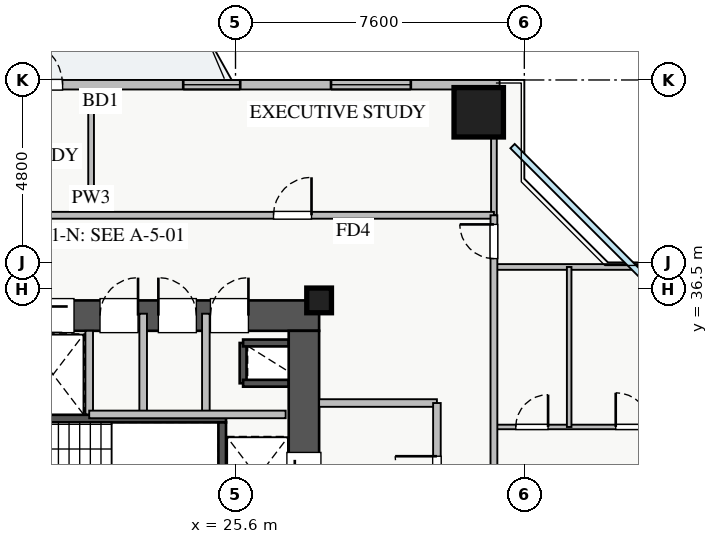
"""IFC4 building model, lengths in metres.
Left out: names, types, materials, properties, quantities, classifications, styles, units other than length and angle.
Written with IfcOpenShell. Run it as: python <this file> out.ifc"""

import sys

from ifc_helpers import new_model, si_unit, direction, frame, frame_2d, origin, origin_2d, place, context, subcontext, project, spatial, rectangle, extrude, source, transform, mapped, element, fill, save


model = new_model("IFC4")
c1 = context("Model", 3, precision=1e-05, world=origin(), true_north=direction((0.0, 1.0)))
c2 = subcontext(c1, "Body", "Model", "MODEL_VIEW")
j1 = project(units=[si_unit("LENGTHUNIT", "METRE"), si_unit("PLANEANGLEUNIT", "RADIAN")], contexts=[c1])
p1 = place(None, origin())
s1 = spatial("IfcSite", under=j1, at=p1, CompositionType="ELEMENT")
p2 = place(p1, origin())
s2 = spatial("IfcBuilding", under=s1, at=p2, CompositionType="ELEMENT")
p3 = place(p2, frame((0.0, 0.0, 50.25)))
s3 = spatial("IfcBuildingStorey", under=s2, at=p3, CompositionType="ELEMENT", Elevation=50.25)
p4 = place(p3, frame((25.8, 34.02, 0.0), z_axis=(0.0, 0.0, 1.0), x_axis=(0.0, 1.0, 0.0)))
e1 = element("IfcWall", 1, at=p4, inside=s3, PredefinedType="SHEAR", context=c2, shape_type="SweptSolid", body=[
    extrude(rectangle(XDim=1.06, YDim=0.18, at=frame_2d((0.53, 0.0))), origin(), (0.0, 0.0, 1.0), 3.07),
])
for number, where, z_axis, x_axis in (
    (2, (25.8, 35.08, 0.0), (0.0, 0.0, 1.0), (1.0, 0.0, 0.0)),
    (3, (25.8, 34.02, 0.0), (0.0, 0.0, 1.0), (1.0, 0.0, 0.0)),
):
    element("IfcWall", number, at=place(p3, frame(where, z_axis=z_axis, x_axis=x_axis)), inside=s3, PredefinedType="SHEAR", context=c2, shape_type="SweptSolid", body=[
        extrude(rectangle(XDim=1.2, YDim=0.18, at=frame_2d((0.6, 0.0))), origin(), (0.0, 0.0, 1.0), 3.07),
    ])
p5 = place(p3, frame((19.88, 33.2, 0.0), z_axis=(0.0, 0.0, 1.0), x_axis=(1.0, 0.0, 0.0)))
e4 = element("IfcWall", 4, at=p5, inside=s3, PredefinedType="SHEAR", context=c2, shape_type="SweptSolid", body=[
    extrude(rectangle(XDim=1.87, YDim=0.18, at=frame_2d((0.935, 0.0))), origin(), (0.0, 0.0, 1.0), 3.07),
])
p6 = place(p3, frame((18.2, 33.09, 0.0), z_axis=(0.0, 0.0, 1.0), x_axis=(1.0, 0.0, 0.0)))
e5 = element("IfcWall", 5, at=p6, inside=s3, PredefinedType="SHEAR", context=c2, shape_type="SweptSolid", body=[
    extrude(rectangle(XDim=7.15, YDim=0.2, at=frame_2d((3.575, 0.0))), origin(), (0.0, 0.0, 1.0), 3.25),
])
p7 = place(p6, frame((0.35, 0.0, 0.0)))
e6 = element("IfcOpeningElement", 6, at=p7, cuts=e5, PredefinedType="OPENING", context=c2, shape_type="SweptSolid", body=[
    extrude(rectangle(XDim=1.1, YDim=2.05, at=frame_2d((0.55, 1.025))), frame((0.0, 0.11, 0.0), z_axis=(0.0, -1.0, 0.0), x_axis=(1.0, 0.0, 0.0)), (0.0, 0.0, 1.0), 0.22),
])
p8 = place(p3, frame((25.25, 30.05, 0.0), z_axis=(0.0, 0.0, 1.0), x_axis=(0.0, 1.0, 0.0)))
e7 = element("IfcWall", 7, at=p8, inside=s3, PredefinedType="SHEAR", context=c2, shape_type="SweptSolid", body=[
    extrude(rectangle(XDim=2.94, YDim=0.2, at=frame_2d((1.47, 0.0))), origin(), (0.0, 0.0, 1.0), 3.25),
])
p9 = place(p3, frame((10.2, 35.8, 0.0), z_axis=(0.0, 0.0, 1.0), x_axis=(1.0, 0.0, 0.0)))
e8 = element("IfcWall", 8, at=p9, inside=s3, PredefinedType="SHEAR", context=c2, shape_type="SweptSolid", body=[
    extrude(rectangle(XDim=17.6, YDim=0.8, at=frame_2d((8.8, 0.0))), origin(), (0.0, 0.0, 1.0), 3.25),
])
p10 = place(p9, frame((1.15, 0.0, 0.0)))
e9 = element("IfcOpeningElement", 9, at=p10, cuts=e8, PredefinedType="OPENING", context=c2, shape_type="SweptSolid", body=[
    extrude(rectangle(XDim=1.1, YDim=2.05, at=frame_2d((0.55, 1.025))), frame((0.0, 0.41, 0.0), z_axis=(0.0, -1.0, 0.0), x_axis=(1.0, 0.0, 0.0)), (0.0, 0.0, 1.0), 0.82),
])
p11 = place(p9, frame((8.3, 0.0, 0.0)))
e10 = element("IfcOpeningElement", 10, at=p11, cuts=e8, PredefinedType="OPENING", context=c2, shape_type="SweptSolid", body=[
    extrude(rectangle(XDim=1.1, YDim=2.05, at=frame_2d((0.55, 1.025))), frame((0.0, 0.41, 0.0), z_axis=(0.0, -1.0, 0.0), x_axis=(1.0, 0.0, 0.0)), (0.0, 0.0, 1.0), 0.82),
])
p12 = place(p9, frame((10.05, 0.0, 0.0)))
e11 = element("IfcOpeningElement", 11, at=p12, cuts=e8, PredefinedType="OPENING", context=c2, shape_type="SweptSolid", body=[
    extrude(rectangle(XDim=1.1, YDim=2.05, at=frame_2d((0.55, 1.025))), frame((0.0, 0.41, 0.0), z_axis=(0.0, -1.0, 0.0), x_axis=(1.0, 0.0, 0.0)), (0.0, 0.0, 1.0), 0.82),
])
p13 = place(p9, frame((14.74, 0.0, 0.0)))
e12 = element("IfcOpeningElement", 12, at=p13, cuts=e8, PredefinedType="OPENING", context=c2, shape_type="SweptSolid", body=[
    extrude(rectangle(XDim=1.0, YDim=2.05, at=frame_2d((0.5, 1.025))), frame((0.0, 0.41, 0.0), z_axis=(0.0, -1.0, 0.0), x_axis=(1.0, 0.0, 0.0)), (0.0, 0.0, 1.0), 0.82),
])
p14 = place(p9, frame((11.835, 0.0, 0.0)))
e13 = element("IfcOpeningElement", 13, at=p14, cuts=e8, PredefinedType="OPENING", context=c2, shape_type="SweptSolid", body=[
    extrude(rectangle(XDim=1.0, YDim=2.05, at=frame_2d((0.5, 1.025))), frame((0.0, 0.41, 0.0), z_axis=(0.0, -1.0, 0.0), x_axis=(1.0, 0.0, 0.0)), (0.0, 0.0, 1.0), 0.82),
])
p15 = place(p9, frame((13.37, 0.0, 0.0)))
e14 = element("IfcOpeningElement", 14, at=p15, cuts=e8, PredefinedType="OPENING", context=c2, shape_type="SweptSolid", body=[
    extrude(rectangle(XDim=1.0, YDim=2.05, at=frame_2d((0.5, 1.025))), frame((0.0, 0.41, 0.0), z_axis=(0.0, -1.0, 0.0), x_axis=(1.0, 0.0, 0.0)), (0.0, 0.0, 1.0), 0.82),
])
p16 = place(p3, frame((27.4, 29.8, 0.0), z_axis=(0.0, 0.0, 1.0), x_axis=(0.0, 1.0, 0.0)))
e15 = element("IfcWall", 15, at=p16, inside=s3, PredefinedType="SHEAR", context=c2, shape_type="SweptSolid", body=[
    extrude(rectangle(XDim=5.6, YDim=0.8, at=frame_2d((2.8, 0.0))), origin(), (0.0, 0.0, 1.0), 3.25),
])
p17 = place(p16, frame((1.1, 0.0, 0.0)))
e16 = element("IfcOpeningElement", 16, at=p17, cuts=e15, PredefinedType="OPENING", context=c2, shape_type="SweptSolid", body=[
    extrude(rectangle(XDim=1.3, YDim=2.05, at=frame_2d((0.65, 1.025))), frame((0.0, 0.41, 0.0), z_axis=(0.0, -1.0, 0.0), x_axis=(1.0, 0.0, 0.0)), (0.0, 0.0, 1.0), 0.82),
])
m1 = source(origin(), c2, "Body", "SweptSolid", [
    extrude(rectangle(XDim=0.65, YDim=0.65, at=origin_2d()), origin(), (0.0, 0.0, 1.0), 3.25),
])
p18 = place(p3, frame((27.8, 36.2, 0.0), z_axis=(0.0, 0.0, 1.0), x_axis=(1.0, 0.0, 0.0)))
e17 = element("IfcColumn", 17, at=p18, inside=s3, PredefinedType="PILASTER", context=c2, shape_type="MappedRepresentation", body=[
    mapped(m1, transform((0.0, 0.0, 0.0), x_axis=(1.0, 0.0, 0.0), y_axis=(0.0, 1.0, 0.0), z_axis=(0.0, 0.0, 1.0), scale=1.0)),
])
m2 = source(origin(), c2, "Body", "SweptSolid", [
    extrude(rectangle(XDim=1.3, YDim=1.3, at=origin_2d()), origin(), (0.0, 0.0, 1.0), 3.25),
])
p19 = place(p3, frame((32.0, 41.15, 0.0), z_axis=(0.0, 0.0, 1.0), x_axis=(1.0, 0.0, 0.0)))
e18 = element("IfcColumn", 18, at=p19, inside=s3, PredefinedType="COLUMN", context=c2, shape_type="MappedRepresentation", body=[
    mapped(m2, transform((0.0, 0.0, 0.0), x_axis=(1.0, 0.0, 0.0), y_axis=(0.0, 1.0, 0.0), z_axis=(0.0, 0.0, 1.0), scale=1.0)),
])
p20 = place(p3, frame((5.45, 41.875, 0.0), z_axis=(0.0, 0.0, 1.0), x_axis=(1.0, 0.0, 0.0)))
e19 = element("IfcWall", 19, at=p20, inside=s3, PredefinedType="STANDARD", context=c2, shape_type="SweptSolid", body=[
    extrude(rectangle(XDim=27.1, YDim=0.25, at=frame_2d((13.55, 0.0))), origin(), (0.0, 0.0, 1.0), 2.61),
])
p21 = place(p20, frame((14.4, 0.0, 0.0)))
e20 = element("IfcOpeningElement", 20, at=p21, cuts=e19, PredefinedType="OPENING", context=c2, shape_type="SweptSolid", body=[
    extrude(rectangle(XDim=1.2, YDim=2.1, at=frame_2d((0.6, 1.05))), frame((0.0, 0.135, 0.0), z_axis=(0.0, -1.0, 0.0), x_axis=(1.0, 0.0, 0.0)), (0.0, 0.0, 1.0), 0.27),
])
p22 = place(p20, frame((1.5, 0.0, 0.9)))
e21 = element("IfcOpeningElement", 21, at=p22, cuts=e19, PredefinedType="OPENING", context=c2, shape_type="SweptSolid", body=[
    extrude(rectangle(XDim=1.5, YDim=1.5, at=frame_2d((0.75, 0.75))), frame((0.0, 0.135, 0.0), z_axis=(0.0, -1.0, 0.0), x_axis=(1.0, 0.0, 0.0)), (0.0, 0.0, 1.0), 0.27),
])
p23 = place(p20, frame((9.263, 0.0, 0.9)))
e22 = element("IfcOpeningElement", 22, at=p23, cuts=e19, PredefinedType="OPENING", context=c2, shape_type="SweptSolid", body=[
    extrude(rectangle(XDim=1.8, YDim=1.45, at=frame_2d((0.9, 0.725))), frame((0.0, 0.135, 0.0), z_axis=(0.0, -1.0, 0.0), x_axis=(1.0, 0.0, 0.0)), (0.0, 0.0, 1.0), 0.27),
])
p24 = place(p20, frame((18.774, 0.0, 0.9)))
e23 = element("IfcOpeningElement", 23, at=p24, cuts=e19, PredefinedType="OPENING", context=c2, shape_type="SweptSolid", body=[
    extrude(rectangle(XDim=1.5, YDim=1.5, at=frame_2d((0.75, 0.75))), frame((0.0, 0.135, 0.0), z_axis=(0.0, -1.0, 0.0), x_axis=(1.0, 0.0, 0.0)), (0.0, 0.0, 1.0), 0.27),
])
p25 = place(p20, frame((22.663, 0.0, 0.9)))
e24 = element("IfcOpeningElement", 24, at=p25, cuts=e19, PredefinedType="OPENING", context=c2, shape_type="SweptSolid", body=[
    extrude(rectangle(XDim=2.1, YDim=1.48, at=frame_2d((1.05, 0.74))), frame((0.0, 0.135, 0.0), z_axis=(0.0, -1.0, 0.0), x_axis=(1.0, 0.0, 0.0)), (0.0, 0.0, 1.0), 0.27),
])
p26 = place(p20, frame((5.134, 0.0, 0.9)))
e25 = element("IfcOpeningElement", 25, at=p26, cuts=e19, PredefinedType="OPENING", context=c2, shape_type="SweptSolid", body=[
    extrude(rectangle(XDim=2.4, YDim=1.5, at=frame_2d((1.2, 0.75))), frame((0.0, 0.135, 0.0), z_axis=(0.0, -1.0, 0.0), x_axis=(1.0, 0.0, 0.0)), (0.0, 0.0, 1.0), 0.27),
])
p27 = place(p3, frame((27.8, 33.5, 0.0), z_axis=(0.0, 0.0, 1.0), x_axis=(1.0, 0.0, 0.0)))
e26 = element("IfcWall", 26, at=p27, inside=s3, PredefinedType="PARTITIONING", context=c2, shape_type="SweptSolid", body=[
    extrude(rectangle(XDim=3.1, YDim=0.2, at=frame_2d((1.55, 0.0))), origin(), (0.0, 0.0, 1.0), 3.07),
])
p28 = place(p3, frame((30.9, 29.6, 0.0), z_axis=(0.0, 0.0, 1.0), x_axis=(0.0, 1.0, 0.0)))
e27 = element("IfcWall", 27, at=p28, inside=s3, PredefinedType="PARTITIONING", context=c2, shape_type="SweptSolid", body=[
    extrude(rectangle(XDim=3.9, YDim=0.2, at=frame_2d((1.95, 0.0))), origin(), (0.0, 0.0, 1.0), 3.07),
])
p29 = place(p28, frame((1.4, 0.0, 0.0)))
e28 = element("IfcOpeningElement", 28, at=p29, cuts=e27, PredefinedType="OPENING", context=c2, shape_type="SweptSolid", body=[
    extrude(rectangle(XDim=1.1, YDim=2.05, at=frame_2d((0.55, 1.025))), frame((0.0, 0.11, 0.0), z_axis=(0.0, -1.0, 0.0), x_axis=(1.0, 0.0, 0.0)), (0.0, 0.0, 1.0), 0.22),
])
p30 = place(p3, frame((24.82, 33.2, 0.0), z_axis=(0.0, 0.0, 1.0), x_axis=(0.0, 1.0, 0.0)))
e29 = element("IfcWall", 29, at=p30, inside=s3, PredefinedType="PARTITIONING", context=c2, shape_type="SweptSolid", body=[
    extrude(rectangle(XDim=2.65, YDim=0.2, at=frame_2d((1.325, 0.0))), origin(), (0.0, 0.0, 1.0), 3.07),
])
p31 = place(p3, frame((21.75, 33.2, 0.0), z_axis=(0.0, 0.0, 1.0), x_axis=(0.0, 1.0, 0.0)))
e30 = element("IfcWall", 30, at=p31, inside=s3, PredefinedType="PARTITIONING", context=c2, shape_type="SweptSolid", body=[
    extrude(rectangle(XDim=2.2, YDim=0.2, at=frame_2d((1.1, 0.0))), origin(), (0.0, 0.0, 1.0), 3.07),
])
p32 = place(p3, frame((23.17, 33.2, 0.0), z_axis=(0.0, 0.0, 1.0), x_axis=(0.0, 1.0, 0.0)))
e31 = element("IfcWall", 31, at=p32, inside=s3, PredefinedType="PARTITIONING", context=c2, shape_type="SweptSolid", body=[
    extrude(rectangle(XDim=2.65, YDim=0.2, at=frame_2d((1.325, 0.0))), origin(), (0.0, 0.0, 1.0), 3.07),
])
p33 = place(p3, frame((21.75, 33.2, 0.0), z_axis=(0.0, 0.0, 1.0), x_axis=(1.0, 0.0, 0.0)))
e32 = element("IfcWall", 32, at=p33, inside=s3, PredefinedType="PARTITIONING", context=c2, shape_type="SweptSolid", body=[
    extrude(rectangle(XDim=5.17, YDim=0.2, at=frame_2d((2.585, 0.0))), origin(), (0.0, 0.0, 1.0), 3.07),
])
for number, where, z_axis, x_axis in (
    (33, (21.8, 38.44, 0.0), (0.0, 0.0, 1.0), (0.0, 1.0, 0.0)),
    (34, (32.4, 38.44, 0.0), (0.0, 0.0, 1.0), (0.0, 1.0, 0.0)),
):
    element("IfcWall", number, at=place(p3, frame(where, z_axis=z_axis, x_axis=x_axis)), inside=s3, PredefinedType="PARTITIONING", context=c2, shape_type="SweptSolid", body=[
        extrude(rectangle(XDim=3.31, YDim=0.15, at=frame_2d((1.655, 0.0))), origin(), (0.0, 0.0, 1.0), 3.07),
    ])
p34 = place(p3, frame((8.82, 38.44, 0.0), z_axis=(0.0, 0.0, 1.0), x_axis=(1.0, 0.0, 0.0)))
e35 = element("IfcWall", 35, at=p34, inside=s3, PredefinedType="PARTITIONING", context=c2, shape_type="SweptSolid", body=[
    extrude(rectangle(XDim=23.58, YDim=0.18, at=frame_2d((11.79, 0.0))), origin(), (0.0, 0.0, 1.0), 3.07),
])
p35 = place(p34, frame((5.99, 0.0, 0.0)))
e36 = element("IfcOpeningElement", 36, at=p35, cuts=e35, PredefinedType="OPENING", context=c2, shape_type="SweptSolid", body=[
    extrude(rectangle(XDim=1.0, YDim=2.05, at=frame_2d((0.5, 1.025))), frame((0.0, 0.1, 0.0), z_axis=(0.0, -1.0, 0.0), x_axis=(1.0, 0.0, 0.0)), (0.0, 0.0, 1.0), 0.2),
])
p36 = place(p34, frame((17.78, 0.0, 0.0)))
e37 = element("IfcOpeningElement", 37, at=p36, cuts=e35, PredefinedType="OPENING", context=c2, shape_type="SweptSolid", body=[
    extrude(rectangle(XDim=1.0, YDim=2.05, at=frame_2d((0.5, 1.025))), frame((0.0, 0.1, 0.0), z_axis=(0.0, -1.0, 0.0), x_axis=(1.0, 0.0, 0.0)), (0.0, 0.0, 1.0), 0.2),
])
p37 = place(p3, frame((32.4, 37.08, 0.0), z_axis=(0.0, 0.0, 1.0), x_axis=(1.0, 0.0, 0.0)))
e38 = element("IfcWall", 38, at=p37, inside=s3, PredefinedType="PARTITIONING", context=c2, shape_type="SweptSolid", body=[
    extrude(rectangle(XDim=5.35, YDim=0.15, at=frame_2d((2.675, 0.0))), origin(), (0.0, 0.0, 1.0), 3.07),
])
p38 = place(p3, frame((32.4, 32.87, 0.0), z_axis=(0.0, 0.0, 1.0), x_axis=(1.0, 0.0, 0.0)))
e39 = element("IfcWall", 39, at=p38, inside=s3, PredefinedType="PLUMBINGWALL", context=c2, shape_type="SweptSolid", body=[
    extrude(rectangle(XDim=5.35, YDim=0.12, at=frame_2d((2.675, 0.0))), origin(), (0.0, 0.0, 1.0), 3.07),
])
p39 = place(p38, frame((0.575, 0.0, 0.0)))
e40 = element("IfcOpeningElement", 40, at=p39, cuts=e39, PredefinedType="OPENING", context=c2, shape_type="SweptSolid", body=[
    extrude(rectangle(XDim=0.85, YDim=2.05, at=frame_2d((0.425, 1.025))), frame((0.0, 0.07, 0.0), z_axis=(0.0, -1.0, 0.0), x_axis=(1.0, 0.0, 0.0)), (0.0, 0.0, 1.0), 0.14),
])
p40 = place(p38, frame((3.205, 0.0, 0.0)))
e41 = element("IfcOpeningElement", 41, at=p40, cuts=e39, PredefinedType="OPENING", context=c2, shape_type="SweptSolid", body=[
    extrude(rectangle(XDim=0.9, YDim=2.05, at=frame_2d((0.45, 1.025))), frame((0.0, 0.07, 0.0), z_axis=(0.0, -1.0, 0.0), x_axis=(1.0, 0.0, 0.0)), (0.0, 0.0, 1.0), 0.14),
])
p41 = place(p3, frame((34.38, 32.87, 0.0), z_axis=(0.0, 0.0, 1.0), x_axis=(0.0, 1.0, 0.0)))
e42 = element("IfcWall", 42, at=p41, inside=s3, PredefinedType="PLUMBINGWALL", context=c2, shape_type="SweptSolid", body=[
    extrude(rectangle(XDim=4.21, YDim=0.12, at=frame_2d((2.105, 0.0))), origin(), (0.0, 0.0, 1.0), 3.07),
])
p42 = place(p3, frame((32.4, 7.21, 0.0), z_axis=(0.0, 0.0, 1.0), x_axis=(0.0, 1.0, 0.0)))
e43 = element("IfcWall", 43, at=p42, inside=s3, PredefinedType="PARTITIONING", context=c2, shape_type="SweptSolid", body=[
    extrude(rectangle(XDim=31.23, YDim=0.18, at=frame_2d((15.615, 0.0))), origin(), (0.0, 0.0, 1.0), 2.765),
])
p43 = place(p42, frame((30.09, 0.0, 0.0)))
e44 = element("IfcOpeningElement", 44, at=p43, cuts=e43, PredefinedType="OPENING", context=c2, shape_type="SweptSolid", body=[
    extrude(rectangle(XDim=0.9, YDim=2.05, at=frame_2d((0.45, 1.025))), frame((0.0, 0.1, 0.0), z_axis=(0.0, -1.0, 0.0), x_axis=(1.0, 0.0, 0.0)), (0.0, 0.0, 1.0), 0.2),
])
p44 = place(p42, frame((0.415, 0.0, 0.0)))
e45 = element("IfcOpeningElement", 45, at=p44, cuts=e43, PredefinedType="OPENING", context=c2, shape_type="SweptSolid", body=[
    extrude(rectangle(XDim=0.9, YDim=2.05, at=frame_2d((0.45, 1.025))), frame((0.0, 0.1, 0.0), z_axis=(0.0, -1.0, 0.0), x_axis=(1.0, 0.0, 0.0)), (0.0, 0.0, 1.0), 0.2),
])
p45 = place(p42, frame((3.585, 0.0, 0.0)))
e46 = element("IfcOpeningElement", 46, at=p45, cuts=e43, PredefinedType="OPENING", context=c2, shape_type="SweptSolid", body=[
    extrude(rectangle(XDim=1.0, YDim=2.05, at=frame_2d((0.5, 1.025))), frame((0.0, 0.1, 0.0), z_axis=(0.0, -1.0, 0.0), x_axis=(1.0, 0.0, 0.0)), (0.0, 0.0, 1.0), 0.2),
])
p46 = place(p42, frame((12.86, 0.0, 0.0)))
e47 = element("IfcOpeningElement", 47, at=p46, cuts=e43, PredefinedType="OPENING", context=c2, shape_type="SweptSolid", body=[
    extrude(rectangle(XDim=1.0, YDim=2.05, at=frame_2d((0.5, 1.025))), frame((0.0, 0.1, 0.0), z_axis=(0.0, -1.0, 0.0), x_axis=(1.0, 0.0, 0.0)), (0.0, 0.0, 1.0), 0.2),
])
p47 = place(p42, frame((22.5, 0.0, 0.0)))
e48 = element("IfcOpeningElement", 48, at=p47, cuts=e43, PredefinedType="OPENING", context=c2, shape_type="SweptSolid", body=[
    extrude(rectangle(XDim=1.0, YDim=2.05, at=frame_2d((0.5, 1.025))), frame((0.0, 0.1, 0.0), z_axis=(0.0, -1.0, 0.0), x_axis=(1.0, 0.0, 0.0)), (0.0, 0.0, 1.0), 0.2),
])
m3 = source(origin(), c2, "Body", "SweptSolid", [
    extrude(rectangle(XDim=1.2, YDim=2.1, at=frame_2d((0.6, 1.05))), frame((0.0, 0.025, 0.0), z_axis=(0.0, -1.0, 0.0), x_axis=(1.0, 0.0, 0.0)), (0.0, 0.0, 1.0), 0.05),
])
p48 = place(p21, origin())
e49 = element("IfcDoor", 49, at=p48, inside=s3, OperationType="SINGLE_SWING_LEFT", PredefinedType="DOOR", context=c2, shape_type="MappedRepresentation", body=[
    mapped(m3, transform((0.0, 0.0, 0.0), x_axis=(1.0, 0.0, 0.0), y_axis=(0.0, 1.0, 0.0), z_axis=(0.0, 0.0, 1.0), scale=1.0)),
])
fill(e20, e49)
m4 = source(origin(), c2, "Body", "SweptSolid", [
    extrude(rectangle(XDim=1.5, YDim=1.5, at=frame_2d((0.75, 0.75))), frame((0.0, 0.03, 0.0), z_axis=(0.0, -1.0, 0.0), x_axis=(1.0, 0.0, 0.0)), (0.0, 0.0, 1.0), 0.06),
])
p49 = place(p24, origin())
e50 = element("IfcWindow", 50, at=p49, inside=s3, PartitioningType="DOUBLE_PANEL_VERTICAL", PredefinedType="WINDOW", context=c2, shape_type="MappedRepresentation", body=[
    mapped(m4, transform((0.0, 0.0, 0.0), x_axis=(1.0, 0.0, 0.0), y_axis=(0.0, 1.0, 0.0), z_axis=(0.0, 0.0, 1.0), scale=1.0)),
])
fill(e23, e50)
m5 = source(origin(), c2, "Body", "SweptSolid", [
    extrude(rectangle(XDim=2.1, YDim=1.48, at=frame_2d((1.05, 0.74))), frame((0.0, 0.03, 0.0), z_axis=(0.0, -1.0, 0.0), x_axis=(1.0, 0.0, 0.0)), (0.0, 0.0, 1.0), 0.06),
])
p50 = place(p25, origin())
e51 = element("IfcWindow", 51, at=p50, inside=s3, PartitioningType="TRIPLE_PANEL_VERTICAL", PredefinedType="WINDOW", context=c2, shape_type="MappedRepresentation", body=[
    mapped(m5, transform((0.0, 0.0, 0.0), x_axis=(1.0, 0.0, 0.0), y_axis=(0.0, 1.0, 0.0), z_axis=(0.0, 0.0, 1.0), scale=1.0)),
])
fill(e24, e51)
m6 = source(origin(), c2, "Body", "SweptSolid", [
    extrude(rectangle(XDim=1.3, YDim=2.05, at=frame_2d((0.65, 1.025))), frame((0.0, 0.025, 0.0), z_axis=(0.0, -1.0, 0.0), x_axis=(1.0, 0.0, 0.0)), (0.0, 0.0, 1.0), 0.05),
])
p51 = place(p17, origin())
e52 = element("IfcDoor", 52, at=p51, inside=s3, OperationType="SLIDING_TO_LEFT", PredefinedType="DOOR", context=c2, shape_type="MappedRepresentation", body=[
    mapped(m6, transform((0.0, 0.0, 0.0), x_axis=(1.0, 0.0, 0.0), y_axis=(0.0, 1.0, 0.0), z_axis=(0.0, 0.0, 1.0), scale=1.0)),
])
fill(e16, e52)
m7 = source(origin(), c2, "Body", "SweptSolid", [
    extrude(rectangle(XDim=1.1, YDim=2.05, at=frame_2d((0.55, 1.025))), frame((0.0, 0.025, 0.0), z_axis=(0.0, -1.0, 0.0), x_axis=(1.0, 0.0, 0.0)), (0.0, 0.0, 1.0), 0.05),
])
p52 = place(p12, origin())
e53 = element("IfcDoor", 53, at=p52, inside=s3, OperationType="SLIDING_TO_LEFT", PredefinedType="DOOR", context=c2, shape_type="MappedRepresentation", body=[
    mapped(m7, transform((0.0, 0.0, 0.0), x_axis=(1.0, 0.0, 0.0), y_axis=(0.0, 1.0, 0.0), z_axis=(0.0, 0.0, 1.0), scale=1.0)),
])
fill(e11, e53)
m8 = source(origin(), c2, "Body", "SweptSolid", [
    extrude(rectangle(XDim=1.0, YDim=2.05, at=frame_2d((0.5, 1.025))), frame((0.0, 0.025, 0.0), z_axis=(0.0, -1.0, 0.0), x_axis=(1.0, 0.0, 0.0)), (0.0, 0.0, 1.0), 0.05),
])
p53 = place(p13, origin())
e54 = element("IfcDoor", 54, at=p53, inside=s3, OperationType="SINGLE_SWING_RIGHT", PredefinedType="DOOR", context=c2, shape_type="MappedRepresentation", body=[
    mapped(m8, transform((0.0, 0.0, 0.0), x_axis=(1.0, 0.0, 0.0), y_axis=(0.0, 1.0, 0.0), z_axis=(0.0, 0.0, 1.0), scale=1.0)),
])
fill(e12, e54)
p54 = place(p14, origin())
e55 = element("IfcDoor", 55, at=p54, inside=s3, OperationType="SINGLE_SWING_RIGHT", PredefinedType="DOOR", context=c2, shape_type="MappedRepresentation", body=[
    mapped(m8, transform((0.0, 0.0, 0.0), x_axis=(1.0, 0.0, 0.0), y_axis=(0.0, 1.0, 0.0), z_axis=(0.0, 0.0, 1.0), scale=1.0)),
])
fill(e13, e55)
p55 = place(p15, origin())
e56 = element("IfcDoor", 56, at=p55, inside=s3, OperationType="SINGLE_SWING_LEFT", PredefinedType="DOOR", context=c2, shape_type="MappedRepresentation", body=[
    mapped(m8, transform((0.0, 0.0, 0.0), x_axis=(1.0, 0.0, 0.0), y_axis=(0.0, 1.0, 0.0), z_axis=(0.0, 0.0, 1.0), scale=1.0)),
])
fill(e14, e56)
p56 = place(p29, origin())
e57 = element("IfcDoor", 57, at=p56, inside=s3, OperationType="SINGLE_SWING_RIGHT", PredefinedType="DOOR", context=c2, shape_type="MappedRepresentation", body=[
    mapped(m7, transform((0.0, 0.0, 0.0), x_axis=(1.0, 0.0, 0.0), y_axis=(0.0, 1.0, 0.0), z_axis=(0.0, 0.0, 1.0), scale=1.0)),
])
fill(e28, e57)
p57 = place(p36, origin())
e58 = element("IfcDoor", 58, at=p57, inside=s3, OperationType="SINGLE_SWING_RIGHT", PredefinedType="DOOR", context=c2, shape_type="MappedRepresentation", body=[
    mapped(m8, transform((0.0, 0.0, 0.0), x_axis=(1.0, 0.0, 0.0), y_axis=(0.0, 1.0, 0.0), z_axis=(0.0, 0.0, 1.0), scale=1.0)),
])
fill(e37, e58)
m9 = source(origin(), c2, "Body", "SweptSolid", [
    extrude(rectangle(XDim=0.85, YDim=2.05, at=frame_2d((0.425, 1.025))), frame((0.0, 0.025, 0.0), z_axis=(0.0, -1.0, 0.0), x_axis=(1.0, 0.0, 0.0)), (0.0, 0.0, 1.0), 0.05),
])
p58 = place(p39, origin())
e59 = element("IfcDoor", 59, at=p58, inside=s3, OperationType="SINGLE_SWING_RIGHT", PredefinedType="DOOR", context=c2, shape_type="MappedRepresentation", body=[
    mapped(m9, transform((0.0, 0.0, 0.0), x_axis=(1.0, 0.0, 0.0), y_axis=(0.0, 1.0, 0.0), z_axis=(0.0, 0.0, 1.0), scale=1.0)),
])
fill(e40, e59)
m10 = source(origin(), c2, "Body", "SweptSolid", [
    extrude(rectangle(XDim=0.9, YDim=2.05, at=frame_2d((0.45, 1.025))), frame((0.0, 0.025, 0.0), z_axis=(0.0, -1.0, 0.0), x_axis=(1.0, 0.0, 0.0)), (0.0, 0.0, 1.0), 0.05),
])
p59 = place(p40, origin())
e60 = element("IfcDoor", 60, at=p59, inside=s3, OperationType="SINGLE_SWING_LEFT", PredefinedType="DOOR", context=c2, shape_type="MappedRepresentation", body=[
    mapped(m10, transform((0.0, 0.0, 0.0), x_axis=(1.0, 0.0, 0.0), y_axis=(0.0, 1.0, 0.0), z_axis=(0.0, 0.0, 1.0), scale=1.0)),
])
fill(e41, e60)
p60 = place(p43, origin())
e61 = element("IfcDoor", 61, at=p60, inside=s3, OperationType="SINGLE_SWING_RIGHT", PredefinedType="DOOR", context=c2, shape_type="MappedRepresentation", body=[
    mapped(m10, transform((0.0, 0.0, 0.0), x_axis=(1.0, 0.0, 0.0), y_axis=(0.0, 1.0, 0.0), z_axis=(0.0, 0.0, 1.0), scale=1.0)),
])
fill(e44, e61)
save(model, sys.argv[1])
